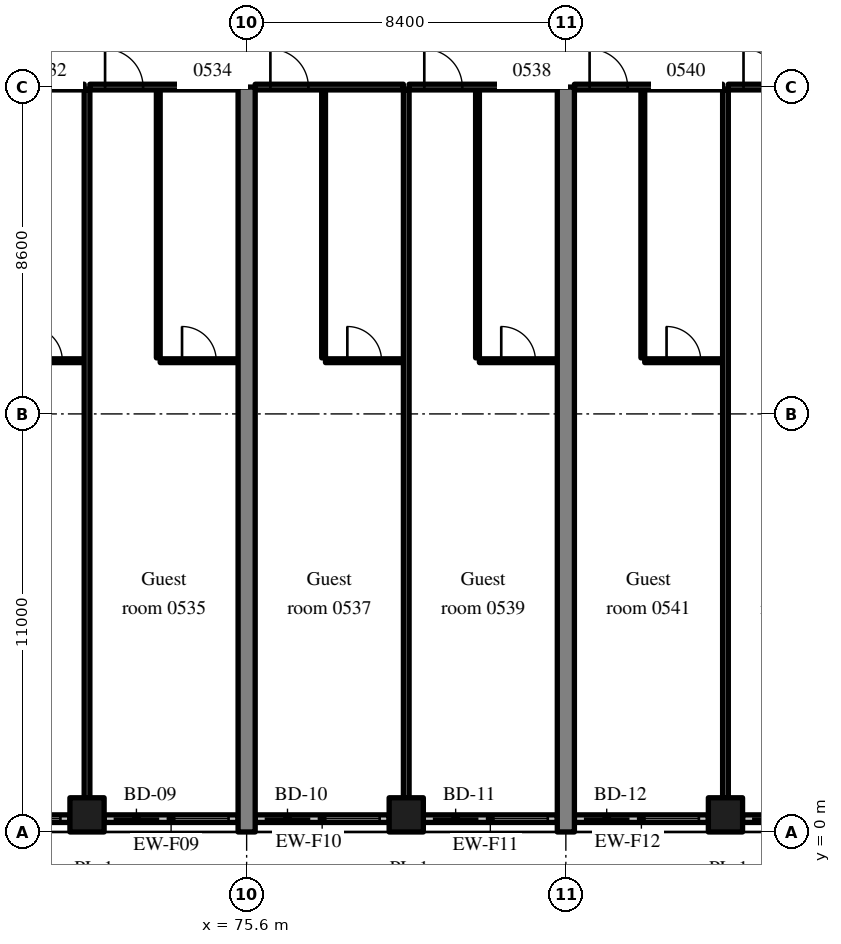
"""IFC4 building model, lengths in metres.
Left out: names, types, materials, properties, quantities, classifications, styles, units other than length and angle.
Written with IfcOpenShell. Run it as: python <this file> out.ifc"""

import sys

from ifc_helpers import new_model, si_unit, direction, frame, frame_2d, origin, origin_2d, place, context, subcontext, project, spatial, rectangle, extrude, source, transform, mapped, element, fill, save


model = new_model("IFC4")
c1 = context("Model", 3, precision=1e-05, world=origin(), true_north=direction((0.0, 1.0)))
c2 = subcontext(c1, "Body", "Model", "MODEL_VIEW")
j1 = project(units=[si_unit("LENGTHUNIT", "METRE"), si_unit("PLANEANGLEUNIT", "RADIAN")], contexts=[c1])
p1 = place(None, origin())
s1 = spatial("IfcSite", under=j1, at=p1, CompositionType="ELEMENT")
p2 = place(p1, origin())
s2 = spatial("IfcBuilding", under=s1, at=p2, CompositionType="ELEMENT")
p3 = place(p2, frame((0.0, 0.0, 27.8)))
s3 = spatial("IfcBuildingStorey", under=s2, at=p3, CompositionType="ELEMENT", Elevation=27.8)
m1 = source(origin(), c2, "Body", "SweptSolid", [
    extrude(rectangle(XDim=19.6, YDim=0.45, at=frame_2d((9.8, 0.0))), origin(), (0.0, 0.0, 1.0), 3.52),
])
for number, where, z_axis, x_axis in (
    (1, (75.6, 0.0, 0.0), (0.0, 0.0, 1.0), (0.0, 1.0, 0.0)),
    (2, (84.0, 0.0, 0.0), (0.0, 0.0, 1.0), (0.0, 1.0, 0.0)),
):
    element("IfcWall", number, at=place(p3, frame(where, z_axis=z_axis, x_axis=x_axis)), inside=s3, PredefinedType="SHEAR", context=c2, shape_type="MappedRepresentation", body=[
        mapped(m1, transform((0.0, 0.0, 0.0), scale=1.0)),
    ])
m2 = source(origin(), c2, "Body", "SweptSolid", [
    extrude(rectangle(XDim=0.9, YDim=0.9, at=origin_2d()), origin(), (0.0, 0.0, 1.0), 3.52),
])
for number, where, z_axis, x_axis in (
    (3, (71.4, 0.45, 0.0), (0.0, 0.0, 1.0), (1.0, 0.0, 0.0)),
    (4, (79.8, 0.45, 0.0), (0.0, 0.0, 1.0), (1.0, 0.0, 0.0)),
    (5, (88.2, 0.45, 0.0), (0.0, 0.0, 1.0), (1.0, 0.0, 0.0)),
):
    element("IfcColumn", number, at=place(p3, frame(where, z_axis=z_axis, x_axis=x_axis)), inside=s3, PredefinedType="COLUMN", context=c2, shape_type="MappedRepresentation", body=[
        mapped(m2, transform((0.0, 0.0, 0.0), scale=1.0)),
    ])
m3 = source(origin(), c2, "Body", "SweptSolid", [
    extrude(rectangle(XDim=3.525, YDim=0.2, at=frame_2d((1.762, 0.0))), origin(), (0.0, 0.0, 1.0), 2.77),
])
p4 = place(p3, frame((67.425, 0.35, 0.0), z_axis=(0.0, 0.0, 1.0), x_axis=(1.0, 0.0, 0.0)))
e6 = element("IfcWall", 6, at=p4, inside=s3, PredefinedType="SOLIDWALL", context=c2, shape_type="MappedRepresentation", body=[
    mapped(m3, transform((0.0, 0.0, 0.0), scale=1.0)),
])
m4 = source(origin(), c2, "Body", "SweptSolid", [
    extrude(rectangle(XDim=1.2, YDim=2.4, at=frame_2d((0.6, 1.2))), frame((0.0, 0.11, 0.0), z_axis=(0.0, -1.0, 0.0), x_axis=(1.0, 0.0, 0.0)), (0.0, 0.0, 1.0), 0.22),
])
p5 = place(p4, frame((0.25, 0.0, 0.0)))
e7 = element("IfcOpeningElement", 7, at=p5, cuts=e6, PredefinedType="OPENING", context=c2, shape_type="MappedRepresentation", body=[
    mapped(m4, transform((0.0, 0.0, 0.0), scale=1.0)),
])
m5 = source(origin(), c2, "Body", "SweptSolid", [
    extrude(rectangle(XDim=1.5, YDim=1.5, at=frame_2d((0.75, 0.75))), frame((0.0, 0.11, 0.0), z_axis=(0.0, -1.0, 0.0), x_axis=(1.0, 0.0, 0.0)), (0.0, 0.0, 1.0), 0.22),
])
p6 = place(p4, frame((1.775, 0.0, 0.9)))
e8 = element("IfcOpeningElement", 8, at=p6, cuts=e6, PredefinedType="OPENING", context=c2, shape_type="MappedRepresentation", body=[
    mapped(m5, transform((0.0, 0.0, 0.0), scale=1.0)),
])
p7 = place(p3, frame((71.85, 0.35, 0.0), z_axis=(0.0, 0.0, 1.0), x_axis=(1.0, 0.0, 0.0)))
e9 = element("IfcWall", 9, at=p7, inside=s3, PredefinedType="SOLIDWALL", context=c2, shape_type="MappedRepresentation", body=[
    mapped(m3, transform((0.0, 0.0, 0.0), scale=1.0)),
])
p8 = place(p7, frame((0.25, 0.0, 0.0)))
e10 = element("IfcOpeningElement", 10, at=p8, cuts=e9, PredefinedType="OPENING", context=c2, shape_type="MappedRepresentation", body=[
    mapped(m4, transform((0.0, 0.0, 0.0), scale=1.0)),
])
p9 = place(p7, frame((1.775, 0.0, 0.9)))
e11 = element("IfcOpeningElement", 11, at=p9, cuts=e9, PredefinedType="OPENING", context=c2, shape_type="MappedRepresentation", body=[
    mapped(m5, transform((0.0, 0.0, 0.0), scale=1.0)),
])
m6 = source(origin(), c2, "Body", "SweptSolid", [
    extrude(rectangle(XDim=3.525, YDim=0.2, at=frame_2d((1.763, 0.0))), origin(), (0.0, 0.0, 1.0), 2.77),
])
p10 = place(p3, frame((75.825, 0.35, 0.0), z_axis=(0.0, 0.0, 1.0), x_axis=(1.0, 0.0, 0.0)))
e12 = element("IfcWall", 12, at=p10, inside=s3, PredefinedType="SOLIDWALL", context=c2, shape_type="MappedRepresentation", body=[
    mapped(m6, transform((0.0, 0.0, 0.0), scale=1.0)),
])
p11 = place(p10, frame((0.25, 0.0, 0.0)))
e13 = element("IfcOpeningElement", 13, at=p11, cuts=e12, PredefinedType="OPENING", context=c2, shape_type="MappedRepresentation", body=[
    mapped(m4, transform((0.0, 0.0, 0.0), scale=1.0)),
])
p12 = place(p10, frame((1.775, 0.0, 0.9)))
e14 = element("IfcOpeningElement", 14, at=p12, cuts=e12, PredefinedType="OPENING", context=c2, shape_type="MappedRepresentation", body=[
    mapped(m5, transform((0.0, 0.0, 0.0), scale=1.0)),
])
p13 = place(p3, frame((80.25, 0.35, 0.0), z_axis=(0.0, 0.0, 1.0), x_axis=(1.0, 0.0, 0.0)))
e15 = element("IfcWall", 15, at=p13, inside=s3, PredefinedType="SOLIDWALL", context=c2, shape_type="MappedRepresentation", body=[
    mapped(m3, transform((0.0, 0.0, 0.0), scale=1.0)),
])
p14 = place(p13, frame((0.25, 0.0, 0.0)))
e16 = element("IfcOpeningElement", 16, at=p14, cuts=e15, PredefinedType="OPENING", context=c2, shape_type="MappedRepresentation", body=[
    mapped(m4, transform((0.0, 0.0, 0.0), scale=1.0)),
])
p15 = place(p13, frame((1.775, 0.0, 0.9)))
e17 = element("IfcOpeningElement", 17, at=p15, cuts=e15, PredefinedType="OPENING", context=c2, shape_type="MappedRepresentation", body=[
    mapped(m5, transform((0.0, 0.0, 0.0), scale=1.0)),
])
p16 = place(p3, frame((84.225, 0.35, 0.0), z_axis=(0.0, 0.0, 1.0), x_axis=(1.0, 0.0, 0.0)))
e18 = element("IfcWall", 18, at=p16, inside=s3, PredefinedType="SOLIDWALL", context=c2, shape_type="MappedRepresentation", body=[
    mapped(m3, transform((0.0, 0.0, 0.0), scale=1.0)),
])
p17 = place(p16, frame((0.25, 0.0, 0.0)))
e19 = element("IfcOpeningElement", 19, at=p17, cuts=e18, PredefinedType="OPENING", context=c2, shape_type="MappedRepresentation", body=[
    mapped(m4, transform((0.0, 0.0, 0.0), scale=1.0)),
])
p18 = place(p16, frame((1.775, 0.0, 0.9)))
e20 = element("IfcOpeningElement", 20, at=p18, cuts=e18, PredefinedType="OPENING", context=c2, shape_type="MappedRepresentation", body=[
    mapped(m5, transform((0.0, 0.0, 0.0), scale=1.0)),
])
p19 = place(p3, frame((88.65, 0.35, 0.0), z_axis=(0.0, 0.0, 1.0), x_axis=(1.0, 0.0, 0.0)))
e21 = element("IfcWall", 21, at=p19, inside=s3, PredefinedType="SOLIDWALL", context=c2, shape_type="MappedRepresentation", body=[
    mapped(m6, transform((0.0, 0.0, 0.0), scale=1.0)),
])
p20 = place(p19, frame((0.25, 0.0, 0.0)))
e22 = element("IfcOpeningElement", 22, at=p20, cuts=e21, PredefinedType="OPENING", context=c2, shape_type="MappedRepresentation", body=[
    mapped(m4, transform((0.0, 0.0, 0.0), scale=1.0)),
])
p21 = place(p19, frame((1.775, 0.0, 0.9)))
e23 = element("IfcOpeningElement", 23, at=p21, cuts=e21, PredefinedType="OPENING", context=c2, shape_type="MappedRepresentation", body=[
    mapped(m5, transform((0.0, 0.0, 0.0), scale=1.0)),
])
m7 = source(origin(), c2, "Body", "SweptSolid", [
    extrude(rectangle(XDim=2.05, YDim=0.1, at=frame_2d((1.025, 0.0))), origin(), (0.0, 0.0, 1.0), 3.52),
])
p22 = place(p3, frame((69.275, 12.4, 0.0), z_axis=(0.0, 0.0, 1.0), x_axis=(1.0, 0.0, 0.0)))
e24 = element("IfcWall", 24, at=p22, inside=s3, PredefinedType="PARTITIONING", context=c2, shape_type="MappedRepresentation", body=[
    mapped(m7, transform((0.0, 0.0, 0.0), scale=1.0)),
])
m8 = source(origin(), c2, "Body", "SweptSolid", [
    extrude(rectangle(XDim=0.9, YDim=2.1, at=frame_2d((0.45, 1.05))), frame((0.0, 0.06, 0.0), z_axis=(0.0, -1.0, 0.0), x_axis=(1.0, 0.0, 0.0)), (0.0, 0.0, 1.0), 0.12),
])
p23 = place(p22, frame((0.575, 0.0, 0.0)))
e25 = element("IfcOpeningElement", 25, at=p23, cuts=e24, PredefinedType="OPENING", context=c2, shape_type="MappedRepresentation", body=[
    mapped(m8, transform((0.0, 0.0, 0.0), scale=1.0)),
])
m9 = source(origin(), c2, "Body", "SweptSolid", [
    extrude(rectangle(XDim=3.9, YDim=0.15, at=frame_2d((1.95, 0.0))), origin(), (0.0, 0.0, 1.0), 2.82),
])
p24 = place(p3, frame((67.425, 19.6, 0.0), z_axis=(0.0, 0.0, 1.0), x_axis=(1.0, 0.0, 0.0)))
e26 = element("IfcWall", 26, at=p24, inside=s3, PredefinedType="PARTITIONING", context=c2, shape_type="MappedRepresentation", body=[
    mapped(m9, transform((0.0, 0.0, 0.0), scale=1.0)),
])
m10 = source(origin(), c2, "Body", "SweptSolid", [
    extrude(rectangle(XDim=1.0, YDim=2.1, at=frame_2d((0.5, 1.05))), frame((0.0, 0.085, 0.0), z_axis=(0.0, -1.0, 0.0), x_axis=(1.0, 0.0, 0.0)), (0.0, 0.0, 1.0), 0.17),
])
p25 = place(p24, frame((0.4, 0.0, 0.0)))
e27 = element("IfcOpeningElement", 27, at=p25, cuts=e26, PredefinedType="OPENING", context=c2, shape_type="MappedRepresentation", body=[
    mapped(m10, transform((0.0, 0.0, 0.0), scale=1.0)),
])
m11 = source(origin(), c2, "Body", "SweptSolid", [
    extrude(rectangle(XDim=7.05, YDim=0.1, at=frame_2d((3.525, 0.0))), origin(), (0.0, 0.0, 1.0), 3.52),
])
p26 = place(p3, frame((73.275, 12.475, 0.0), z_axis=(0.0, 0.0, 1.0), x_axis=(0.0, 1.0, 0.0)))
e28 = element("IfcWall", 28, at=p26, inside=s3, PredefinedType="PARTITIONING", context=c2, shape_type="MappedRepresentation", body=[
    mapped(m11, transform((0.0, 0.0, 0.0), scale=1.0)),
])
p27 = place(p3, frame((73.325, 12.4, 0.0), z_axis=(0.0, 0.0, 1.0), x_axis=(1.0, 0.0, 0.0)))
e29 = element("IfcWall", 29, at=p27, inside=s3, PredefinedType="PARTITIONING", context=c2, shape_type="MappedRepresentation", body=[
    mapped(m7, transform((0.0, 0.0, 0.0), scale=1.0)),
])
p28 = place(p27, frame((0.575, 0.0, 0.0)))
e30 = element("IfcOpeningElement", 30, at=p28, cuts=e29, PredefinedType="OPENING", context=c2, shape_type="MappedRepresentation", body=[
    mapped(m8, transform((0.0, 0.0, 0.0), scale=1.0)),
])
p29 = place(p3, frame((71.475, 19.6, 0.0), z_axis=(0.0, 0.0, 1.0), x_axis=(1.0, 0.0, 0.0)))
e31 = element("IfcWall", 31, at=p29, inside=s3, PredefinedType="PARTITIONING", context=c2, shape_type="MappedRepresentation", body=[
    mapped(m9, transform((0.0, 0.0, 0.0), scale=1.0)),
])
p30 = place(p29, frame((0.4, 0.0, 0.0)))
e32 = element("IfcOpeningElement", 32, at=p30, cuts=e31, PredefinedType="OPENING", context=c2, shape_type="MappedRepresentation", body=[
    mapped(m10, transform((0.0, 0.0, 0.0), scale=1.0)),
])
m12 = source(origin(), c2, "Body", "SweptSolid", [
    extrude(rectangle(XDim=18.625, YDim=0.15, at=frame_2d((9.312, 0.0))), origin(), (0.0, 0.0, 1.0), 3.52),
])
p31 = place(p3, frame((71.4, 0.9, 0.0), z_axis=(0.0, 0.0, 1.0), x_axis=(0.0, 1.0, 0.0)))
e33 = element("IfcWall", 33, at=p31, inside=s3, PredefinedType="PARTITIONING", context=c2, shape_type="MappedRepresentation", body=[
    mapped(m12, transform((0.0, 0.0, 0.0), scale=1.0)),
])
p32 = place(p3, frame((77.625, 12.475, 0.0), z_axis=(0.0, 0.0, 1.0), x_axis=(0.0, 1.0, 0.0)))
e34 = element("IfcWall", 34, at=p32, inside=s3, PredefinedType="PARTITIONING", context=c2, shape_type="MappedRepresentation", body=[
    mapped(m11, transform((0.0, 0.0, 0.0), scale=1.0)),
])
p33 = place(p3, frame((77.675, 12.4, 0.0), z_axis=(0.0, 0.0, 1.0), x_axis=(1.0, 0.0, 0.0)))
e35 = element("IfcWall", 35, at=p33, inside=s3, PredefinedType="PARTITIONING", context=c2, shape_type="MappedRepresentation", body=[
    mapped(m7, transform((0.0, 0.0, 0.0), scale=1.0)),
])
p34 = place(p33, frame((0.575, 0.0, 0.0)))
e36 = element("IfcOpeningElement", 36, at=p34, cuts=e35, PredefinedType="OPENING", context=c2, shape_type="MappedRepresentation", body=[
    mapped(m8, transform((0.0, 0.0, 0.0), scale=1.0)),
])
m13 = source(origin(), c2, "Body", "SweptSolid", [
    extrude(rectangle(XDim=3.9, YDim=0.15, at=frame_2d((1.95, 0.0))), origin(), (0.0, 0.0, 1.0), 2.82),
])
p35 = place(p3, frame((75.825, 19.6, 0.0), z_axis=(0.0, 0.0, 1.0), x_axis=(1.0, 0.0, 0.0)))
e37 = element("IfcWall", 37, at=p35, inside=s3, PredefinedType="PARTITIONING", context=c2, shape_type="MappedRepresentation", body=[
    mapped(m13, transform((0.0, 0.0, 0.0), scale=1.0)),
])
p36 = place(p35, frame((0.4, 0.0, 0.0)))
e38 = element("IfcOpeningElement", 38, at=p36, cuts=e37, PredefinedType="OPENING", context=c2, shape_type="MappedRepresentation", body=[
    mapped(m10, transform((0.0, 0.0, 0.0), scale=1.0)),
])
p37 = place(p3, frame((81.675, 12.475, 0.0), z_axis=(0.0, 0.0, 1.0), x_axis=(0.0, 1.0, 0.0)))
e39 = element("IfcWall", 39, at=p37, inside=s3, PredefinedType="PARTITIONING", context=c2, shape_type="MappedRepresentation", body=[
    mapped(m11, transform((0.0, 0.0, 0.0), scale=1.0)),
])
m14 = source(origin(), c2, "Body", "SweptSolid", [
    extrude(rectangle(XDim=2.05, YDim=0.1, at=frame_2d((1.025, 0.0))), origin(), (0.0, 0.0, 1.0), 3.52),
])
p38 = place(p3, frame((81.725, 12.4, 0.0), z_axis=(0.0, 0.0, 1.0), x_axis=(1.0, 0.0, 0.0)))
e40 = element("IfcWall", 40, at=p38, inside=s3, PredefinedType="PARTITIONING", context=c2, shape_type="MappedRepresentation", body=[
    mapped(m14, transform((0.0, 0.0, 0.0), scale=1.0)),
])
p39 = place(p38, frame((0.575, 0.0, 0.0)))
e41 = element("IfcOpeningElement", 41, at=p39, cuts=e40, PredefinedType="OPENING", context=c2, shape_type="MappedRepresentation", body=[
    mapped(m8, transform((0.0, 0.0, 0.0), scale=1.0)),
])
p40 = place(p3, frame((79.875, 19.6, 0.0), z_axis=(0.0, 0.0, 1.0), x_axis=(1.0, 0.0, 0.0)))
e42 = element("IfcWall", 42, at=p40, inside=s3, PredefinedType="PARTITIONING", context=c2, shape_type="MappedRepresentation", body=[
    mapped(m9, transform((0.0, 0.0, 0.0), scale=1.0)),
])
p41 = place(p40, frame((0.4, 0.0, 0.0)))
e43 = element("IfcOpeningElement", 43, at=p41, cuts=e42, PredefinedType="OPENING", context=c2, shape_type="MappedRepresentation", body=[
    mapped(m10, transform((0.0, 0.0, 0.0), scale=1.0)),
])
p42 = place(p3, frame((79.8, 0.9, 0.0), z_axis=(0.0, 0.0, 1.0), x_axis=(0.0, 1.0, 0.0)))
e44 = element("IfcWall", 44, at=p42, inside=s3, PredefinedType="PARTITIONING", context=c2, shape_type="MappedRepresentation", body=[
    mapped(m12, transform((0.0, 0.0, 0.0), scale=1.0)),
])
p43 = place(p3, frame((86.025, 12.475, 0.0), z_axis=(0.0, 0.0, 1.0), x_axis=(0.0, 1.0, 0.0)))
e45 = element("IfcWall", 45, at=p43, inside=s3, PredefinedType="PARTITIONING", context=c2, shape_type="MappedRepresentation", body=[
    mapped(m11, transform((0.0, 0.0, 0.0), scale=1.0)),
])
p44 = place(p3, frame((86.075, 12.4, 0.0), z_axis=(0.0, 0.0, 1.0), x_axis=(1.0, 0.0, 0.0)))
e46 = element("IfcWall", 46, at=p44, inside=s3, PredefinedType="PARTITIONING", context=c2, shape_type="MappedRepresentation", body=[
    mapped(m7, transform((0.0, 0.0, 0.0), scale=1.0)),
])
p45 = place(p44, frame((0.575, 0.0, 0.0)))
e47 = element("IfcOpeningElement", 47, at=p45, cuts=e46, PredefinedType="OPENING", context=c2, shape_type="MappedRepresentation", body=[
    mapped(m8, transform((0.0, 0.0, 0.0), scale=1.0)),
])
p46 = place(p3, frame((84.225, 19.6, 0.0), z_axis=(0.0, 0.0, 1.0), x_axis=(1.0, 0.0, 0.0)))
e48 = element("IfcWall", 48, at=p46, inside=s3, PredefinedType="PARTITIONING", context=c2, shape_type="MappedRepresentation", body=[
    mapped(m9, transform((0.0, 0.0, 0.0), scale=1.0)),
])
p47 = place(p46, frame((0.4, 0.0, 0.0)))
e49 = element("IfcOpeningElement", 49, at=p47, cuts=e48, PredefinedType="OPENING", context=c2, shape_type="MappedRepresentation", body=[
    mapped(m10, transform((0.0, 0.0, 0.0), scale=1.0)),
])
p48 = place(p3, frame((88.275, 19.6, 0.0), z_axis=(0.0, 0.0, 1.0), x_axis=(1.0, 0.0, 0.0)))
e50 = element("IfcWall", 50, at=p48, inside=s3, PredefinedType="PARTITIONING", context=c2, shape_type="MappedRepresentation", body=[
    mapped(m13, transform((0.0, 0.0, 0.0), scale=1.0)),
])
p49 = place(p48, frame((0.4, 0.0, 0.0)))
e51 = element("IfcOpeningElement", 51, at=p49, cuts=e50, PredefinedType="OPENING", context=c2, shape_type="MappedRepresentation", body=[
    mapped(m10, transform((0.0, 0.0, 0.0), scale=1.0)),
])
p50 = place(p3, frame((88.2, 0.9, 0.0), z_axis=(0.0, 0.0, 1.0), x_axis=(0.0, 1.0, 0.0)))
e52 = element("IfcWall", 52, at=p50, inside=s3, PredefinedType="PARTITIONING", context=c2, shape_type="MappedRepresentation", body=[
    mapped(m12, transform((0.0, 0.0, 0.0), scale=1.0)),
])
m15 = source(origin(), c2, "Body", "SweptSolid", [
    extrude(rectangle(XDim=1.5, YDim=1.5, at=frame_2d((0.75, 0.75))), frame((0.0, 0.03, 0.0), z_axis=(0.0, -1.0, 0.0), x_axis=(1.0, 0.0, 0.0)), (0.0, 0.0, 1.0), 0.06),
])
p51 = place(p6, origin())
e53 = element("IfcWindow", 53, at=p51, inside=s3, PartitioningType="SINGLE_PANEL", PredefinedType="WINDOW", context=c2, shape_type="MappedRepresentation", body=[
    mapped(m15, transform((0.0, 0.0, 0.0), scale=1.0)),
])
fill(e8, e53)
m16 = source(origin(), c2, "Body", "SweptSolid", [
    extrude(rectangle(XDim=1.2, YDim=2.4, at=frame_2d((0.6, 1.2))), frame((0.0, 0.025, 0.0), z_axis=(0.0, -1.0, 0.0), x_axis=(1.0, 0.0, 0.0)), (0.0, 0.0, 1.0), 0.05),
])
p52 = place(p8, origin())
e54 = element("IfcDoor", 54, at=p52, inside=s3, OperationType="SLIDING_TO_LEFT", PredefinedType="DOOR", context=c2, shape_type="MappedRepresentation", body=[
    mapped(m16, transform((0.0, 0.0, 0.0), scale=1.0)),
])
fill(e10, e54)
p53 = place(p9, origin())
e55 = element("IfcWindow", 55, at=p53, inside=s3, PartitioningType="SINGLE_PANEL", PredefinedType="WINDOW", context=c2, shape_type="MappedRepresentation", body=[
    mapped(m15, transform((0.0, 0.0, 0.0), scale=1.0)),
])
fill(e11, e55)
p54 = place(p11, origin())
e56 = element("IfcDoor", 56, at=p54, inside=s3, OperationType="SLIDING_TO_RIGHT", PredefinedType="DOOR", context=c2, shape_type="MappedRepresentation", body=[
    mapped(m16, transform((0.0, 0.0, 0.0), scale=1.0)),
])
fill(e13, e56)
p55 = place(p12, origin())
e57 = element("IfcWindow", 57, at=p55, inside=s3, PartitioningType="SINGLE_PANEL", PredefinedType="WINDOW", context=c2, shape_type="MappedRepresentation", body=[
    mapped(m15, transform((0.0, 0.0, 0.0), scale=1.0)),
])
fill(e14, e57)
p56 = place(p14, origin())
e58 = element("IfcDoor", 58, at=p56, inside=s3, OperationType="SLIDING_TO_LEFT", PredefinedType="DOOR", context=c2, shape_type="MappedRepresentation", body=[
    mapped(m16, transform((0.0, 0.0, 0.0), scale=1.0)),
])
fill(e16, e58)
p57 = place(p15, origin())
e59 = element("IfcWindow", 59, at=p57, inside=s3, PartitioningType="SINGLE_PANEL", PredefinedType="WINDOW", context=c2, shape_type="MappedRepresentation", body=[
    mapped(m15, transform((0.0, 0.0, 0.0), scale=1.0)),
])
fill(e17, e59)
p58 = place(p17, origin())
e60 = element("IfcDoor", 60, at=p58, inside=s3, OperationType="SLIDING_TO_RIGHT", PredefinedType="DOOR", context=c2, shape_type="MappedRepresentation", body=[
    mapped(m16, transform((0.0, 0.0, 0.0), scale=1.0)),
])
fill(e19, e60)
p59 = place(p18, origin())
e61 = element("IfcWindow", 61, at=p59, inside=s3, PartitioningType="SINGLE_PANEL", PredefinedType="WINDOW", context=c2, shape_type="MappedRepresentation", body=[
    mapped(m15, transform((0.0, 0.0, 0.0), scale=1.0)),
])
fill(e20, e61)
p60 = place(p20, origin())
e62 = element("IfcDoor", 62, at=p60, inside=s3, OperationType="SLIDING_TO_LEFT", PredefinedType="DOOR", context=c2, shape_type="MappedRepresentation", body=[
    mapped(m16, transform((0.0, 0.0, 0.0), scale=1.0)),
])
fill(e22, e62)
m17 = source(origin(), c2, "Body", "SweptSolid", [
    extrude(rectangle(XDim=0.9, YDim=2.1, at=frame_2d((0.45, 1.05))), frame((0.0, 0.025, 0.0), z_axis=(0.0, -1.0, 0.0), x_axis=(1.0, 0.0, 0.0)), (0.0, 0.0, 1.0), 0.05),
])
p61 = place(p23, origin())
e63 = element("IfcDoor", 63, at=p61, inside=s3, OperationType="SINGLE_SWING_LEFT", PredefinedType="DOOR", context=c2, shape_type="MappedRepresentation", body=[
    mapped(m17, transform((0.0, 0.0, 0.0), scale=1.0)),
])
fill(e25, e63)
p62 = place(p28, origin())
e64 = element("IfcDoor", 64, at=p62, inside=s3, OperationType="SINGLE_SWING_LEFT", PredefinedType="DOOR", context=c2, shape_type="MappedRepresentation", body=[
    mapped(m17, transform((0.0, 0.0, 0.0), scale=1.0)),
])
fill(e30, e64)
m18 = source(origin(), c2, "Body", "SweptSolid", [
    extrude(rectangle(XDim=1.0, YDim=2.1, at=frame_2d((0.5, 1.05))), frame((0.0, 0.025, 0.0), z_axis=(0.0, -1.0, 0.0), x_axis=(1.0, 0.0, 0.0)), (0.0, 0.0, 1.0), 0.05),
])
p63 = place(p30, origin())
e65 = element("IfcDoor", 65, at=p63, inside=s3, OperationType="SINGLE_SWING_LEFT", PredefinedType="DOOR", context=c2, shape_type="MappedRepresentation", body=[
    mapped(m18, transform((0.0, 0.0, 0.0), scale=1.0)),
])
fill(e32, e65)
p64 = place(p34, origin())
e66 = element("IfcDoor", 66, at=p64, inside=s3, OperationType="SINGLE_SWING_LEFT", PredefinedType="DOOR", context=c2, shape_type="MappedRepresentation", body=[
    mapped(m17, transform((0.0, 0.0, 0.0), scale=1.0)),
])
fill(e36, e66)
p65 = place(p36, origin())
e67 = element("IfcDoor", 67, at=p65, inside=s3, OperationType="SINGLE_SWING_LEFT", PredefinedType="DOOR", context=c2, shape_type="MappedRepresentation", body=[
    mapped(m18, transform((0.0, 0.0, 0.0), scale=1.0)),
])
fill(e38, e67)
p66 = place(p39, origin())
e68 = element("IfcDoor", 68, at=p66, inside=s3, OperationType="SINGLE_SWING_LEFT", PredefinedType="DOOR", context=c2, shape_type="MappedRepresentation", body=[
    mapped(m17, transform((0.0, 0.0, 0.0), scale=1.0)),
])
fill(e41, e68)
p67 = place(p41, origin())
e69 = element("IfcDoor", 69, at=p67, inside=s3, OperationType="SINGLE_SWING_LEFT", PredefinedType="DOOR", context=c2, shape_type="MappedRepresentation", body=[
    mapped(m18, transform((0.0, 0.0, 0.0), scale=1.0)),
])
fill(e43, e69)
p68 = place(p45, origin())
e70 = element("IfcDoor", 70, at=p68, inside=s3, OperationType="SINGLE_SWING_LEFT", PredefinedType="DOOR", context=c2, shape_type="MappedRepresentation", body=[
    mapped(m17, transform((0.0, 0.0, 0.0), scale=1.0)),
])
fill(e47, e70)
p69 = place(p47, origin())
e71 = element("IfcDoor", 71, at=p69, inside=s3, OperationType="SINGLE_SWING_LEFT", PredefinedType="DOOR", context=c2, shape_type="MappedRepresentation", body=[
    mapped(m18, transform((0.0, 0.0, 0.0), scale=1.0)),
])
fill(e49, e71)
p70 = place(p49, origin())
e72 = element("IfcDoor", 72, at=p70, inside=s3, OperationType="SINGLE_SWING_LEFT", PredefinedType="DOOR", context=c2, shape_type="MappedRepresentation", body=[
    mapped(m18, transform((0.0, 0.0, 0.0), scale=1.0)),
])
fill(e51, e72)
save(model, sys.argv[1])
